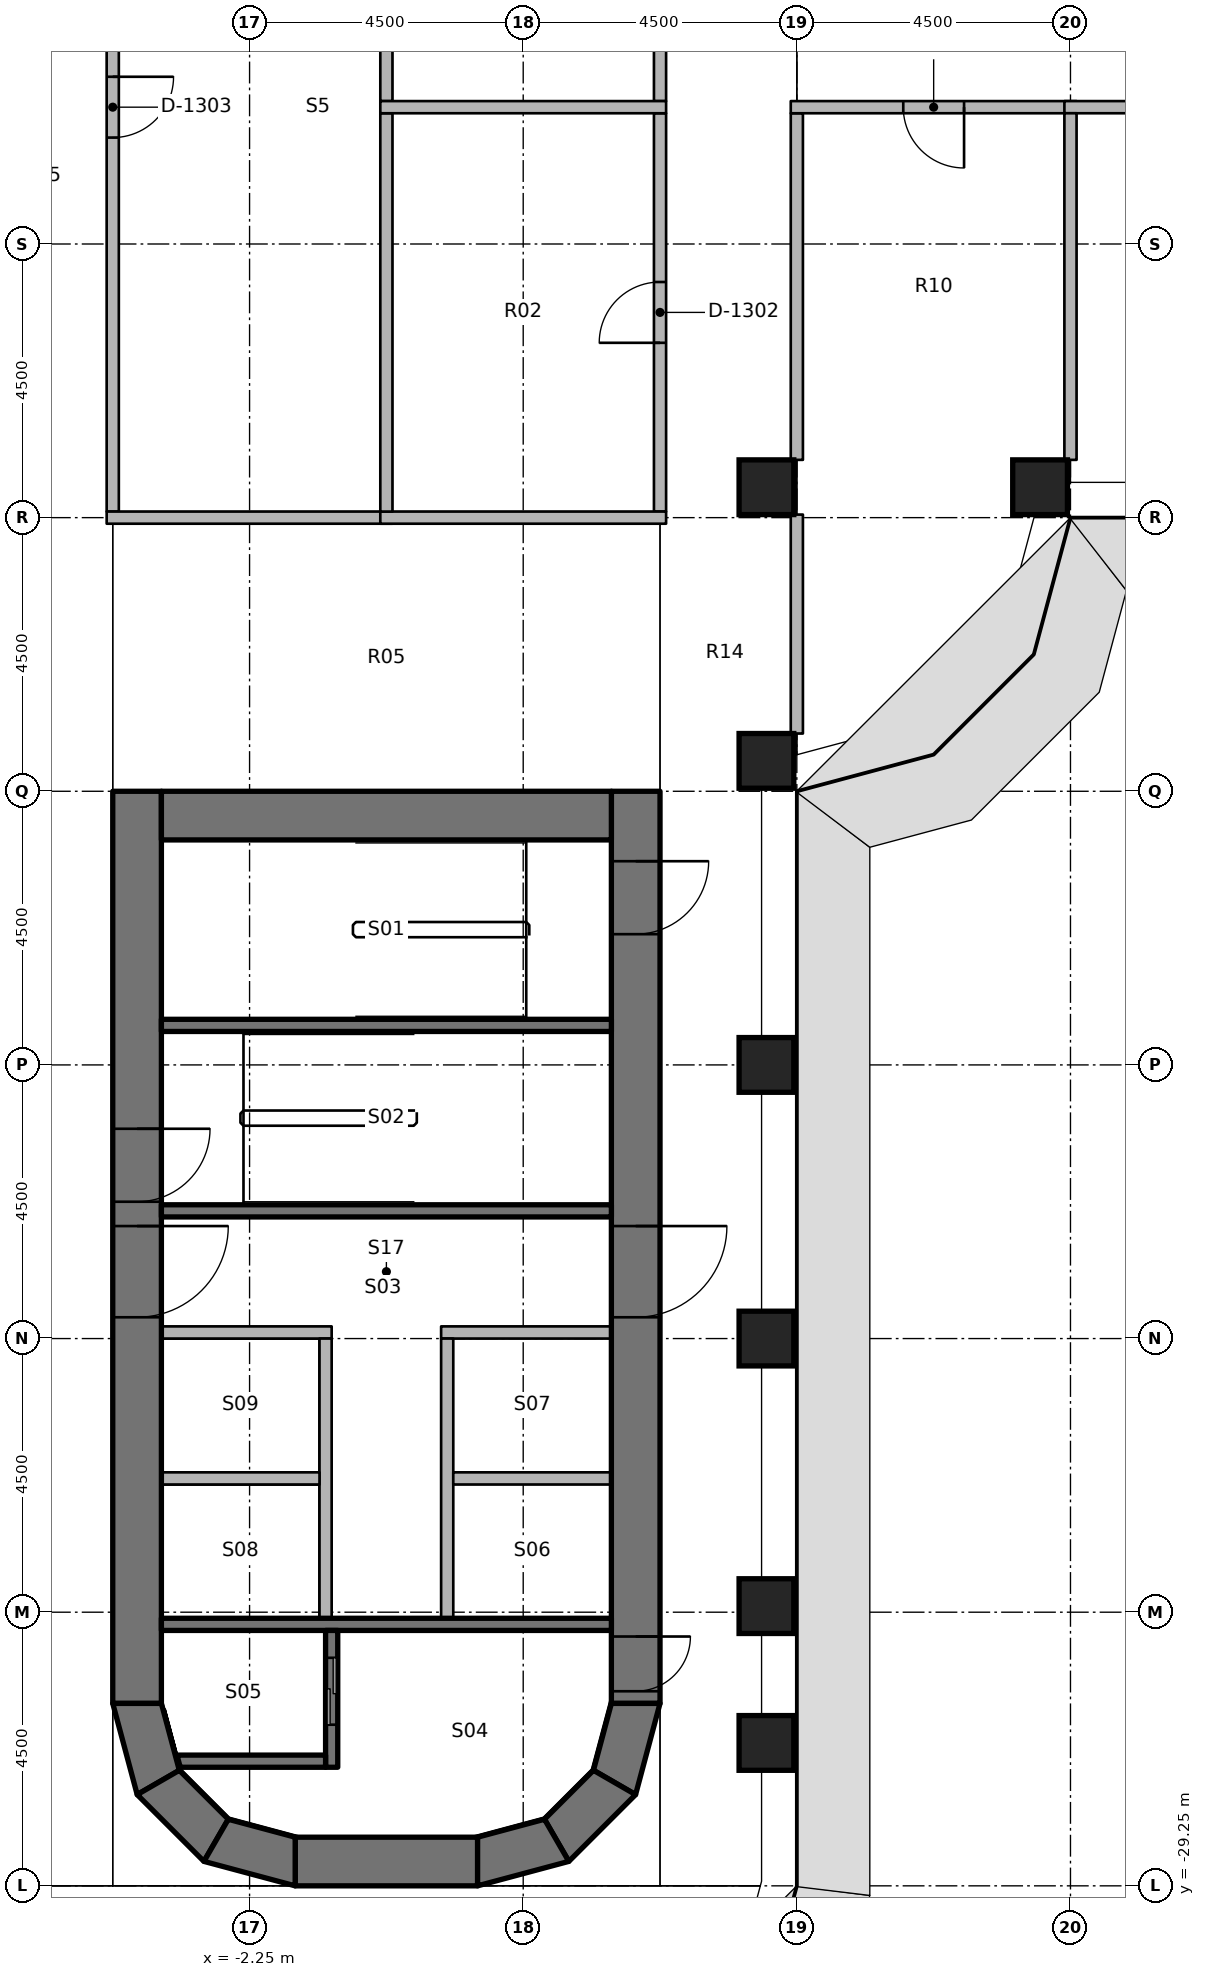
"""IFC4 building model, lengths in metres.
Left out: names, types, materials, properties, quantities, classifications, styles, units other than length and angle.
Written with IfcOpenShell. Run it as: python <this file> out.ifc"""

import sys

from ifc_helpers import new_model, si_unit, direction, frame, frame_2d, origin, origin_2d, place, context, subcontext, project, spatial, polyline, rectangle, outline, extrude, element, fill, save


model = new_model("IFC4")
c1 = context("Model", 3, precision=1e-05, world=origin(), true_north=direction((0.0, 1.0)))
c2 = subcontext(c1, "Body", "Model", "MODEL_VIEW")
j1 = project(units=[si_unit("LENGTHUNIT", "METRE"), si_unit("PLANEANGLEUNIT", "RADIAN")], contexts=[c1])
p1 = place(None, origin())
s1 = spatial("IfcSite", under=j1, at=p1, CompositionType="ELEMENT")
p2 = place(p1, origin())
s2 = spatial("IfcBuilding", under=s1, at=p2, CompositionType="ELEMENT")
p3 = place(p2, frame((0.0, 0.0, 132.2)))
s3 = spatial("IfcBuildingStorey", under=s2, at=p3, CompositionType="ELEMENT", Elevation=132.2)
for number, where, z_axis, x_axis in (
    (1, (6.25, -26.9, 0.0), (0.0, 0.0, 1.0), (1.0, 0.0, 0.0)),
    (2, (6.25, -24.65, 0.0), (0.0, 0.0, 1.0), (1.0, 0.0, 0.0)),
    (3, (6.25, -20.25, 0.0), (0.0, 0.0, 1.0), (1.0, 0.0, 0.0)),
    (4, (6.25, -15.75, 0.0), (0.0, 0.0, 1.0), (1.0, 0.0, 0.0)),
    (5, (6.25, -10.75, 0.0), (0.0, 0.0, 1.0), (1.0, 0.0, 0.0)),
    (6, (6.25, -6.25, 0.0), (0.0, 0.0, 1.0), (1.0, 0.0, 0.0)),
    (7, (10.75, -6.25, 0.0), (0.0, 0.0, 1.0), (1.0, 0.0, 0.0)),
):
    element("IfcColumn", number, at=place(p3, frame(where, z_axis=z_axis, x_axis=x_axis)), inside=s3, PredefinedType="COLUMN", context=c2, shape_type="SweptSolid", body=[
        extrude(rectangle(XDim=0.9, YDim=0.9, at=origin_2d()), origin(), (0.0, 0.0, 1.0), 3.65),
    ])
p4 = place(p3, frame((-4.1, -11.25, 0.0), z_axis=(0.0, 0.0, 1.0), x_axis=(0.0, -1.0, 0.0)))
e8 = element("IfcWall", 8, at=p4, inside=s3, PredefinedType="SHEAR", context=c2, shape_type="SweptSolid", body=[
    extrude(rectangle(XDim=15.0, YDim=0.8, at=frame_2d((7.5, 0.0))), origin(), (0.0, 0.0, 1.0), 3.8),
])
p5 = place(p4, frame((7.15, 0.0, 0.0)))
e9 = element("IfcOpeningElement", 9, at=p5, cuts=e8, PredefinedType="OPENING", context=c2, shape_type="SweptSolid", body=[
    extrude(rectangle(XDim=1.5, YDim=2.3, at=frame_2d((0.75, 1.15))), frame((0.0, 0.41, 0.0), z_axis=(0.0, -1.0, 0.0), x_axis=(1.0, 0.0, 0.0)), (0.0, 0.0, 1.0), 0.82),
])
p6 = place(p4, frame((5.55, 0.0, 0.0)))
e10 = element("IfcOpeningElement", 10, at=p6, cuts=e8, PredefinedType="OPENING", context=c2, shape_type="SweptSolid", body=[
    extrude(rectangle(XDim=1.2, YDim=2.1, at=frame_2d((0.6, 1.05))), frame((0.0, 0.41, 0.0), z_axis=(0.0, -1.0, 0.0), x_axis=(1.0, 0.0, 0.0)), (0.0, 0.0, 1.0), 0.82),
])
p7 = place(p3, frame((4.1, -11.25, 0.0), z_axis=(0.0, 0.0, 1.0), x_axis=(0.0, -1.0, 0.0)))
e11 = element("IfcWall", 11, at=p7, inside=s3, PredefinedType="SHEAR", context=c2, shape_type="SweptSolid", body=[
    extrude(rectangle(XDim=15.0, YDim=0.8, at=frame_2d((7.5, 0.0))), origin(), (0.0, 0.0, 1.0), 3.8),
])
p8 = place(p7, frame((7.15, 0.0, 0.0)))
e12 = element("IfcOpeningElement", 12, at=p8, cuts=e11, PredefinedType="OPENING", context=c2, shape_type="SweptSolid", body=[
    extrude(rectangle(XDim=1.5, YDim=2.3, at=frame_2d((0.75, 1.15))), frame((0.0, 0.41, 0.0), z_axis=(0.0, -1.0, 0.0), x_axis=(1.0, 0.0, 0.0)), (0.0, 0.0, 1.0), 0.82),
])
p9 = place(p7, frame((13.9, 0.0, 0.0)))
e13 = element("IfcOpeningElement", 13, at=p9, cuts=e11, PredefinedType="OPENING", context=c2, shape_type="SweptSolid", body=[
    extrude(rectangle(XDim=0.9, YDim=2.1, at=frame_2d((0.45, 1.05))), frame((0.0, 0.41, 0.0), z_axis=(0.0, -1.0, 0.0), x_axis=(1.0, 0.0, 0.0)), (0.0, 0.0, 1.0), 0.82),
])
p10 = place(p7, frame((1.15, 0.0, 0.0)))
e14 = element("IfcOpeningElement", 14, at=p10, cuts=e11, PredefinedType="OPENING", context=c2, shape_type="SweptSolid", body=[
    extrude(rectangle(XDim=1.2, YDim=2.1, at=frame_2d((0.6, 1.05))), frame((0.0, 0.41, 0.0), z_axis=(0.0, -1.0, 0.0), x_axis=(1.0, 0.0, 0.0)), (0.0, 0.0, 1.0), 0.82),
])
p11 = place(p3, frame((-3.7, -11.65, 0.0), z_axis=(0.0, 0.0, 1.0), x_axis=(1.0, 0.0, 0.0)))
e15 = element("IfcWall", 15, at=p11, inside=s3, PredefinedType="SHEAR", context=c2, shape_type="SweptSolid", body=[
    extrude(rectangle(XDim=7.4, YDim=0.8, at=frame_2d((3.7, 0.0))), origin(), (0.0, 0.0, 1.0), 3.8),
])
p12 = place(p3, frame((-1.5, -28.85, 0.0), z_axis=(0.0, 0.0, 1.0), x_axis=(1.0, 0.0, 0.0)))
e16 = element("IfcWall", 16, at=p12, inside=s3, PredefinedType="SHEAR", context=c2, shape_type="SweptSolid", body=[
    extrude(rectangle(XDim=3.0, YDim=0.8, at=frame_2d((1.5, 0.0))), origin(), (0.0, 0.0, 1.0), 3.8),
])
p13 = place(p3, origin())
e17 = element("IfcWall", 17, at=p13, inside=s3, PredefinedType="SHEAR", context=c2, shape_type="SweptSolid", body=[
    extrude(outline(polyline([(-4.5, -26.25), (-4.098, -27.75), (-3.405, -27.35), (-3.7, -26.25), (-4.5, -26.25)])), origin(), (0.0, 0.0, 1.0), 3.8),
])
p14 = place(p3, origin())
e18 = element("IfcWall", 18, at=p14, inside=s3, PredefinedType="SHEAR", context=c2, shape_type="SweptSolid", body=[
    extrude(outline(polyline([(-4.098, -27.75), (-3.0, -28.848), (-2.6, -28.155), (-3.405, -27.35), (-4.098, -27.75)])), origin(), (0.0, 0.0, 1.0), 3.8),
])
p15 = place(p3, origin())
e19 = element("IfcWall", 19, at=p15, inside=s3, PredefinedType="SHEAR", context=c2, shape_type="SweptSolid", body=[
    extrude(outline(polyline([(-3.0, -28.848), (-1.5, -29.25), (-1.5, -28.45), (-2.6, -28.155), (-3.0, -28.848)])), origin(), (0.0, 0.0, 1.0), 3.8),
])
p16 = place(p3, origin())
e20 = element("IfcWall", 20, at=p16, inside=s3, PredefinedType="SHEAR", context=c2, shape_type="SweptSolid", body=[
    extrude(outline(polyline([(4.5, -26.25), (4.098, -27.75), (3.405, -27.35), (3.7, -26.25), (4.5, -26.25)])), origin(), (0.0, 0.0, 1.0), 3.8),
])
p17 = place(p3, origin())
e21 = element("IfcWall", 21, at=p17, inside=s3, PredefinedType="SHEAR", context=c2, shape_type="SweptSolid", body=[
    extrude(outline(polyline([(4.098, -27.75), (3.0, -28.848), (2.6, -28.155), (3.405, -27.35), (4.098, -27.75)])), origin(), (0.0, 0.0, 1.0), 3.8),
])
p18 = place(p3, origin())
e22 = element("IfcWall", 22, at=p18, inside=s3, PredefinedType="SHEAR", context=c2, shape_type="SweptSolid", body=[
    extrude(outline(polyline([(3.0, -28.848), (1.5, -29.25), (1.5, -28.45), (2.6, -28.155), (3.0, -28.848)])), origin(), (0.0, 0.0, 1.0), 3.8),
])
p19 = place(p3, frame((3.7, -24.95, 0.0), z_axis=(0.0, 0.0, 1.0), x_axis=(-1.0, 0.0, 0.0)))
e23 = element("IfcWall", 23, at=p19, inside=s3, PredefinedType="SHEAR", context=c2, shape_type="SweptSolid", body=[
    extrude(rectangle(XDim=7.4, YDim=0.2, at=frame_2d((3.7, 0.0))), origin(), (0.0, 0.0, 1.0), 3.65),
])
p20 = place(p3, frame((-0.9, -27.3, 0.0), z_axis=(0.0, 0.0, 1.0), x_axis=(0.0, 1.0, 0.0)))
e24 = element("IfcWall", 24, at=p20, inside=s3, PredefinedType="SHEAR", context=c2, shape_type="SweptSolid", body=[
    extrude(rectangle(XDim=2.25, YDim=0.2, at=frame_2d((1.125, 0.0))), origin(), (0.0, 0.0, 1.0), 3.65),
])
p21 = place(p20, frame((0.7, 0.0, 0.0)))
e25 = element("IfcOpeningElement", 25, at=p21, cuts=e24, PredefinedType="OPENING", context=c2, shape_type="SweptSolid", body=[
    extrude(rectangle(XDim=1.1, YDim=2.3, at=frame_2d((0.55, 1.15))), frame((0.0, 0.11, 0.0), z_axis=(0.0, -1.0, 0.0), x_axis=(1.0, 0.0, 0.0)), (0.0, 0.0, 1.0), 0.22),
])
p22 = place(p3, origin())
e26 = element("IfcWall", 26, at=p22, inside=s3, PredefinedType="SHEAR", context=c2, shape_type="SweptSolid", body=[
    extrude(outline(polyline([(-1.0, -27.1), (-3.444, -27.1), (-3.39, -27.3), (-1.0, -27.3), (-1.0, -27.1)])), origin(), (0.0, 0.0, 1.0), 3.65),
])
for number, where, z_axis, x_axis in (
    (27, (3.7, -18.15, 0.0), (0.0, 0.0, 1.0), (-1.0, 0.0, 0.0)),
    (28, (3.7, -15.1, 0.0), (0.0, 0.0, 1.0), (-1.0, 0.0, 0.0)),
):
    element("IfcWall", number, at=place(p3, frame(where, z_axis=z_axis, x_axis=x_axis)), inside=s3, PredefinedType="SHEAR", context=c2, shape_type="SweptSolid", body=[
        extrude(rectangle(XDim=7.4, YDim=0.2, at=frame_2d((3.7, 0.0))), origin(), (0.0, 0.0, 1.0), 3.65),
    ])
p23 = place(p3, frame((3.7, -20.15, 0.0), z_axis=(0.0, 0.0, 1.0), x_axis=(-1.0, 0.0, 0.0)))
e29 = element("IfcWall", 29, at=p23, inside=s3, PredefinedType="PARTITIONING", context=c2, shape_type="SweptSolid", body=[
    extrude(rectangle(XDim=2.8, YDim=0.2, at=frame_2d((1.4, 0.0))), origin(), (0.0, 0.0, 1.0), 3.65),
])
p24 = place(p3, frame((1.0, -24.85, 0.0), z_axis=(0.0, 0.0, 1.0), x_axis=(0.0, 1.0, 0.0)))
e30 = element("IfcWall", 30, at=p24, inside=s3, PredefinedType="PARTITIONING", context=c2, shape_type="SweptSolid", body=[
    extrude(rectangle(XDim=4.6, YDim=0.2, at=frame_2d((2.3, 0.0))), origin(), (0.0, 0.0, 1.0), 3.65),
])
p25 = place(p3, frame((-0.9, -20.15, 0.0), z_axis=(0.0, 0.0, 1.0), x_axis=(-1.0, 0.0, 0.0)))
e31 = element("IfcWall", 31, at=p25, inside=s3, PredefinedType="PARTITIONING", context=c2, shape_type="SweptSolid", body=[
    extrude(rectangle(XDim=2.8, YDim=0.2, at=frame_2d((1.4, 0.0))), origin(), (0.0, 0.0, 1.0), 3.65),
])
p26 = place(p3, frame((-1.0, -24.85, 0.0), z_axis=(0.0, 0.0, 1.0), x_axis=(0.0, 1.0, 0.0)))
e32 = element("IfcWall", 32, at=p26, inside=s3, PredefinedType="PARTITIONING", context=c2, shape_type="SweptSolid", body=[
    extrude(rectangle(XDim=4.6, YDim=0.2, at=frame_2d((2.3, 0.0))), origin(), (0.0, 0.0, 1.0), 3.65),
])
for number, where, z_axis, x_axis in (
    (33, (3.7, -22.55, 0.0), (0.0, 0.0, 1.0), (-1.0, 0.0, 0.0)),
    (34, (-1.1, -22.55, 0.0), (0.0, 0.0, 1.0), (-1.0, 0.0, 0.0)),
):
    element("IfcWall", number, at=place(p3, frame(where, z_axis=z_axis, x_axis=x_axis)), inside=s3, PredefinedType="PARTITIONING", context=c2, shape_type="SweptSolid", body=[
        extrude(rectangle(XDim=2.6, YDim=0.2, at=frame_2d((1.3, 0.0))), origin(), (0.0, 0.0, 1.0), 3.65),
    ])
p27 = place(p3, frame((-4.5, 6.65, 0.0), z_axis=(0.0, 0.0, 1.0), x_axis=(0.0, -1.0, 0.0)))
e35 = element("IfcWall", 35, at=p27, inside=s3, PredefinedType="PARTITIONING", context=c2, shape_type="SweptSolid", body=[
    extrude(rectangle(XDim=13.3, YDim=0.2, at=frame_2d((6.65, 0.0))), origin(), (0.0, 0.0, 1.0), 2.738),
])
p28 = place(p27, frame((6.15, 0.0, 0.0)))
e36 = element("IfcOpeningElement", 36, at=p28, cuts=e35, PredefinedType="OPENING", context=c2, shape_type="SweptSolid", body=[
    extrude(rectangle(XDim=1.0, YDim=2.1, at=frame_2d((0.5, 1.05))), frame((0.0, 0.11, 0.0), z_axis=(0.0, -1.0, 0.0), x_axis=(1.0, 0.0, 0.0)), (0.0, 0.0, 1.0), 0.22),
])
p29 = place(p3, frame((4.5, 0.1, 0.0), z_axis=(0.0, 0.0, 1.0), x_axis=(0.0, 1.0, 0.0)))
e37 = element("IfcWall", 37, at=p29, inside=s3, PredefinedType="PARTITIONING", context=c2, shape_type="SweptSolid", body=[
    extrude(rectangle(XDim=6.55, YDim=0.2, at=frame_2d((3.275, 0.0))), origin(), (0.0, 0.0, 1.0), 2.738),
])
p30 = place(p29, frame((2.775, 0.0, 0.0)))
e38 = element("IfcOpeningElement", 38, at=p30, cuts=e37, PredefinedType="OPENING", context=c2, shape_type="SweptSolid", body=[
    extrude(rectangle(XDim=1.0, YDim=2.1, at=frame_2d((0.5, 1.05))), frame((0.0, 0.11, 0.0), z_axis=(0.0, -1.0, 0.0), x_axis=(1.0, 0.0, 0.0)), (0.0, 0.0, 1.0), 0.22),
])
p31 = place(p3, frame((4.5, -6.65, 0.0), z_axis=(0.0, 0.0, 1.0), x_axis=(0.0, 1.0, 0.0)))
e39 = element("IfcWall", 39, at=p31, inside=s3, PredefinedType="PARTITIONING", context=c2, shape_type="SweptSolid", body=[
    extrude(rectangle(XDim=6.55, YDim=0.2, at=frame_2d((3.275, 0.0))), origin(), (0.0, 0.0, 1.0), 2.738),
])
p32 = place(p31, frame((2.775, 0.0, 0.0)))
e40 = element("IfcOpeningElement", 40, at=p32, cuts=e39, PredefinedType="OPENING", context=c2, shape_type="SweptSolid", body=[
    extrude(rectangle(XDim=1.0, YDim=2.1, at=frame_2d((0.5, 1.05))), frame((0.0, 0.11, 0.0), z_axis=(0.0, -1.0, 0.0), x_axis=(1.0, 0.0, 0.0)), (0.0, 0.0, 1.0), 0.22),
])
p33 = place(p3, frame((6.75, -10.3, 0.0), z_axis=(0.0, 0.0, 1.0), x_axis=(0.0, 1.0, 0.0)))
e41 = element("IfcWall", 41, at=p33, inside=s3, PredefinedType="PARTITIONING", context=c2, shape_type="SweptSolid", body=[
    extrude(rectangle(XDim=3.6, YDim=0.2, at=frame_2d((1.8, 0.0))), origin(), (0.0, 0.0, 1.0), 2.738),
])
p34 = place(p3, frame((6.75, -5.8, 0.0), z_axis=(0.0, 0.0, 1.0), x_axis=(0.0, 1.0, 0.0)))
e42 = element("IfcWall", 42, at=p34, inside=s3, PredefinedType="PARTITIONING", context=c2, shape_type="SweptSolid", body=[
    extrude(rectangle(XDim=5.7, YDim=0.2, at=frame_2d((2.85, 0.0))), origin(), (0.0, 0.0, 1.0), 2.738),
])
for number, where, z_axis, x_axis in (
    (43, (-4.6, -6.75, 0.0), (0.0, 0.0, 1.0), (1.0, 0.0, 0.0)),
    (44, (-0.1, -6.75, 0.0), (0.0, 0.0, 1.0), (1.0, 0.0, 0.0)),
):
    element("IfcWall", number, at=place(p3, frame(where, z_axis=z_axis, x_axis=x_axis)), inside=s3, PredefinedType="PARTITIONING", context=c2, shape_type="SweptSolid", body=[
        extrude(rectangle(XDim=4.7, YDim=0.2, at=frame_2d((2.35, 0.0))), origin(), (0.0, 0.0, 1.0), 2.738),
    ])
for number, where, z_axis, x_axis in (
    (45, (0.0, 0.1, 0.0), (0.0, 0.0, 1.0), (0.0, 1.0, 0.0)),
    (46, (0.0, -6.65, 0.0), (0.0, 0.0, 1.0), (0.0, 1.0, 0.0)),
):
    element("IfcWall", number, at=place(p3, frame(where, z_axis=z_axis, x_axis=x_axis)), inside=s3, PredefinedType="PARTITIONING", context=c2, shape_type="SweptSolid", body=[
        extrude(rectangle(XDim=6.55, YDim=0.2, at=frame_2d((3.275, 0.0))), origin(), (0.0, 0.0, 1.0), 2.738),
    ])
p35 = place(p3, frame((-0.1, 0.0, 0.0), z_axis=(0.0, 0.0, 1.0), x_axis=(1.0, 0.0, 0.0)))
e47 = element("IfcWall", 47, at=p35, inside=s3, PredefinedType="PARTITIONING", context=c2, shape_type="SweptSolid", body=[
    extrude(rectangle(XDim=4.7, YDim=0.2, at=frame_2d((2.35, 0.0))), origin(), (0.0, 0.0, 1.0), 2.738),
])
p36 = place(p3, frame((11.35, 0.0, 0.0), z_axis=(0.0, 0.0, 1.0), x_axis=(-1.0, 0.0, 0.0)))
e48 = element("IfcWall", 48, at=p36, inside=s3, PredefinedType="PARTITIONING", context=c2, shape_type="SweptSolid", body=[
    extrude(rectangle(XDim=4.7, YDim=0.2, at=frame_2d((2.35, 0.0))), origin(), (0.0, 0.0, 1.0), 2.738),
])
p37 = place(p36, frame((1.85, 0.0, 0.0)))
e49 = element("IfcOpeningElement", 49, at=p37, cuts=e48, PredefinedType="OPENING", context=c2, shape_type="SweptSolid", body=[
    extrude(rectangle(XDim=1.0, YDim=2.1, at=frame_2d((0.5, 1.05))), frame((0.0, 0.11, 0.0), z_axis=(0.0, -1.0, 0.0), x_axis=(1.0, 0.0, 0.0)), (0.0, 0.0, 1.0), 0.22),
])
p38 = place(p3, frame((15.85, 0.0, 0.0), z_axis=(0.0, 0.0, 1.0), x_axis=(-1.0, 0.0, 0.0)))
e50 = element("IfcWall", 50, at=p38, inside=s3, PredefinedType="PARTITIONING", context=c2, shape_type="SweptSolid", body=[
    extrude(rectangle(XDim=4.7, YDim=0.2, at=frame_2d((2.35, 0.0))), origin(), (0.0, 0.0, 1.0), 2.738),
])
p39 = place(p38, frame((1.85, 0.0, 0.0)))
e51 = element("IfcOpeningElement", 51, at=p39, cuts=e50, PredefinedType="OPENING", context=c2, shape_type="SweptSolid", body=[
    extrude(rectangle(XDim=1.0, YDim=2.1, at=frame_2d((0.5, 1.05))), frame((0.0, 0.11, 0.0), z_axis=(0.0, -1.0, 0.0), x_axis=(1.0, 0.0, 0.0)), (0.0, 0.0, 1.0), 0.22),
])
p40 = place(p3, frame((11.25, -5.8, 0.0), z_axis=(0.0, 0.0, 1.0), x_axis=(0.0, 1.0, 0.0)))
e52 = element("IfcWall", 52, at=p40, inside=s3, PredefinedType="PARTITIONING", context=c2, shape_type="SweptSolid", body=[
    extrude(rectangle(XDim=5.7, YDim=0.2, at=frame_2d((2.85, 0.0))), origin(), (0.0, 0.0, 1.0), 2.738),
])
p41 = place(p8, origin())
e53 = element("IfcDoor", 53, at=p41, inside=s3, OperationType="DOUBLE_DOOR_SINGLE_SWING", PredefinedType="DOOR", context=c2, shape_type="SweptSolid", body=[
    extrude(rectangle(XDim=1.5, YDim=2.3, at=frame_2d((0.75, 1.15))), frame((0.0, 0.025, 0.0), z_axis=(0.0, -1.0, 0.0), x_axis=(1.0, 0.0, 0.0)), (0.0, 0.0, 1.0), 0.05),
])
fill(e12, e53)
p42 = place(p5, origin())
e54 = element("IfcDoor", 54, at=p42, inside=s3, OperationType="DOUBLE_DOOR_SINGLE_SWING", PredefinedType="DOOR", context=c2, shape_type="SweptSolid", body=[
    extrude(rectangle(XDim=1.5, YDim=2.3, at=frame_2d((0.75, 1.15))), frame((0.0, 0.025, 0.0), z_axis=(0.0, -1.0, 0.0), x_axis=(1.0, 0.0, 0.0)), (0.0, 0.0, 1.0), 0.05),
])
fill(e9, e54)
p43 = place(p9, origin())
e55 = element("IfcDoor", 55, at=p43, inside=s3, OperationType="SINGLE_SWING_LEFT", PredefinedType="DOOR", context=c2, shape_type="SweptSolid", body=[
    extrude(rectangle(XDim=0.9, YDim=2.1, at=frame_2d((0.45, 1.05))), frame((0.0, 0.025, 0.0), z_axis=(0.0, -1.0, 0.0), x_axis=(1.0, 0.0, 0.0)), (0.0, 0.0, 1.0), 0.05),
])
fill(e13, e55)
p44 = place(p6, origin())
e56 = element("IfcDoor", 56, at=p44, inside=s3, OperationType="SINGLE_SWING_RIGHT", PredefinedType="DOOR", context=c2, shape_type="SweptSolid", body=[
    extrude(rectangle(XDim=1.2, YDim=2.1, at=frame_2d((0.6, 1.05))), frame((0.0, 0.025, 0.0), z_axis=(0.0, -1.0, 0.0), x_axis=(1.0, 0.0, 0.0)), (0.0, 0.0, 1.0), 0.05),
])
fill(e10, e56)
p45 = place(p10, origin())
e57 = element("IfcDoor", 57, at=p45, inside=s3, OperationType="SINGLE_SWING_LEFT", PredefinedType="DOOR", context=c2, shape_type="SweptSolid", body=[
    extrude(rectangle(XDim=1.2, YDim=2.1, at=frame_2d((0.6, 1.05))), frame((0.0, 0.025, 0.0), z_axis=(0.0, -1.0, 0.0), x_axis=(1.0, 0.0, 0.0)), (0.0, 0.0, 1.0), 0.05),
])
fill(e14, e57)
p46 = place(p21, origin())
e58 = element("IfcDoor", 58, at=p46, inside=s3, OperationType="DOUBLE_DOOR_SLIDING", PredefinedType="DOOR", context=c2, shape_type="SweptSolid", body=[
    extrude(rectangle(XDim=1.1, YDim=2.3, at=frame_2d((0.55, 1.15))), frame((0.0, 0.025, 0.0), z_axis=(0.0, -1.0, 0.0), x_axis=(1.0, 0.0, 0.0)), (0.0, 0.0, 1.0), 0.05),
])
fill(e25, e58)
p47 = place(p32, origin())
e59 = element("IfcDoor", 59, at=p47, inside=s3, OperationType="SINGLE_SWING_RIGHT", PredefinedType="DOOR", context=c2, shape_type="SweptSolid", body=[
    extrude(rectangle(XDim=1.0, YDim=2.1, at=frame_2d((0.5, 1.05))), frame((0.0, 0.025, 0.0), z_axis=(0.0, -1.0, 0.0), x_axis=(1.0, 0.0, 0.0)), (0.0, 0.0, 1.0), 0.05),
])
fill(e40, e59)
p48 = place(p28, origin())
e60 = element("IfcDoor", 60, at=p48, inside=s3, OperationType="SINGLE_SWING_RIGHT", PredefinedType="DOOR", context=c2, shape_type="SweptSolid", body=[
    extrude(rectangle(XDim=1.0, YDim=2.1, at=frame_2d((0.5, 1.05))), frame((0.0, 0.025, 0.0), z_axis=(0.0, -1.0, 0.0), x_axis=(1.0, 0.0, 0.0)), (0.0, 0.0, 1.0), 0.05),
])
fill(e36, e60)
p49 = place(p37, origin())
e61 = element("IfcDoor", 61, at=p49, inside=s3, OperationType="SINGLE_SWING_RIGHT", PredefinedType="DOOR", context=c2, shape_type="SweptSolid", body=[
    extrude(rectangle(XDim=1.0, YDim=2.1, at=frame_2d((0.5, 1.05))), frame((0.0, 0.025, 0.0), z_axis=(0.0, -1.0, 0.0), x_axis=(1.0, 0.0, 0.0)), (0.0, 0.0, 1.0), 0.05),
])
fill(e49, e61)
save(model, sys.argv[1])
